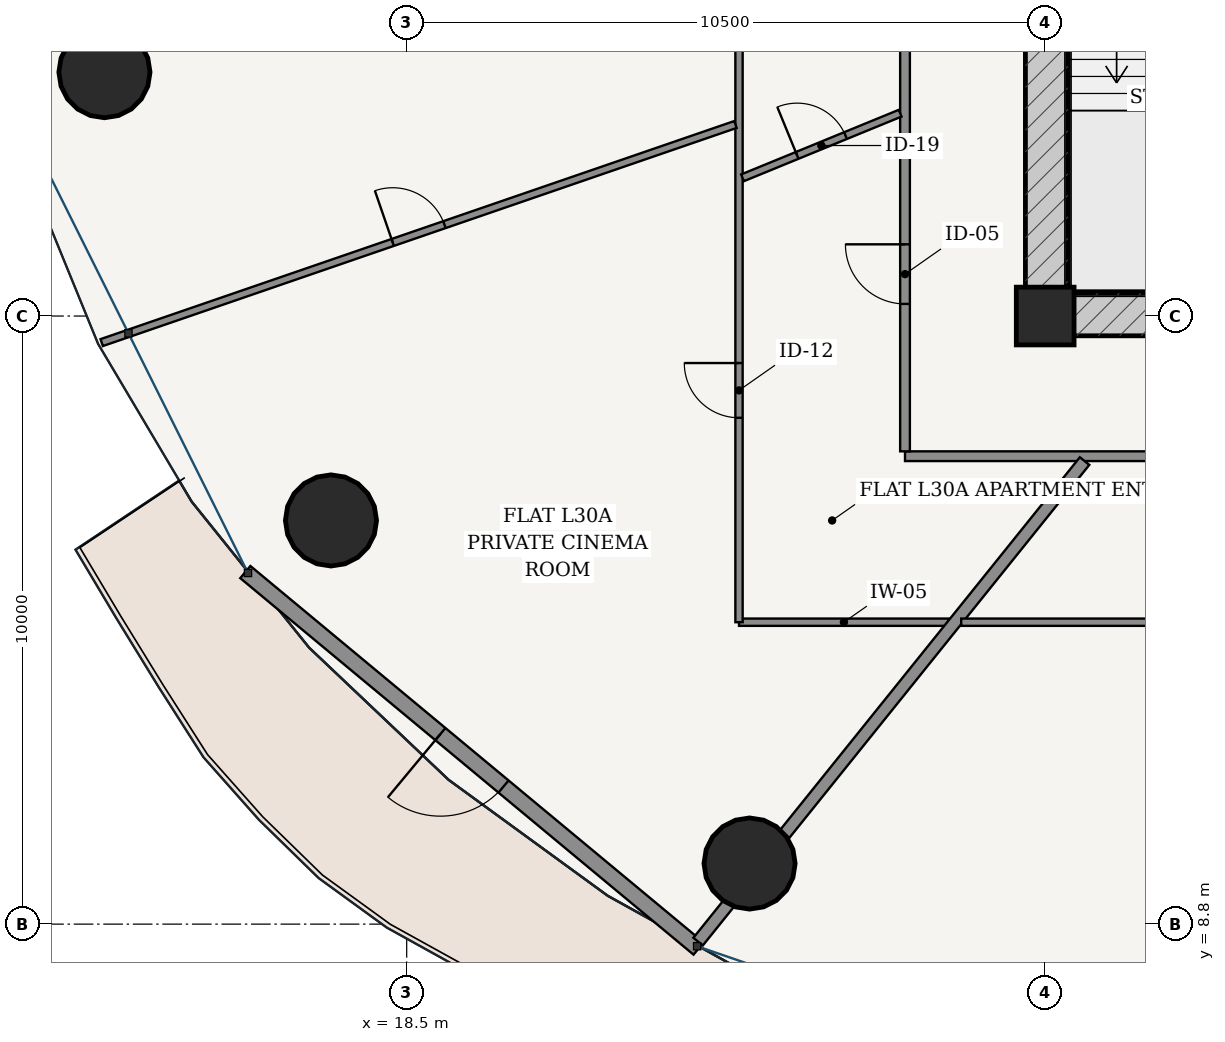
"""IFC4 building model, lengths in metres.
Left out: names, types, materials, properties, quantities, classifications, styles, units other than length and angle.
Written with IfcOpenShell. Run it as: python <this file> out.ifc"""

import sys

from ifc_helpers import new_model, si_unit, direction, frame, frame_2d, origin, origin_2d, place, context, subcontext, project, spatial, rectangle, hollow_circle, extrude, source, transform, mapped, element, fill, save


model = new_model("IFC4")
c1 = context("Model", 3, precision=1e-05, world=origin(), true_north=direction((-0.2419218956, 0.970295726276)))
c2 = subcontext(c1, "Body", "Model", "MODEL_VIEW")
j1 = project(units=[si_unit("LENGTHUNIT", "METRE"), si_unit("PLANEANGLEUNIT", "RADIAN")], contexts=[c1])
p1 = place(None, origin())
s1 = spatial("IfcSite", under=j1, at=p1, CompositionType="ELEMENT")
p2 = place(p1, origin())
s2 = spatial("IfcBuilding", under=s1, at=p2, CompositionType="ELEMENT")
p3 = place(p2, frame((0.0, 0.0, 115.8)))
s3 = spatial("IfcBuildingStorey", under=s2, at=p3, CompositionType="ELEMENT", Elevation=115.8)
p4 = place(p3, frame((29.0, 18.8, 0.0), z_axis=(0.0, 0.0, 1.0), x_axis=(1.0, 0.0, 0.0)))
e1 = element("IfcColumn", 1, at=p4, inside=s3, PredefinedType="COLUMN", context=c2, shape_type="SweptSolid", body=[
    extrude(rectangle(XDim=0.95, YDim=0.95, at=origin_2d()), origin(), (0.0, 0.0, 1.0), 3.6),
])
p5 = place(p3, frame((28.675, 18.825, 0.0), z_axis=(0.0, 0.0, 1.0), x_axis=(1.0, 0.0, 0.0)))
e2 = element("IfcWall", 2, at=p5, inside=s3, PredefinedType="SHEAR", context=c2, shape_type="SweptSolid", body=[
    extrude(rectangle(XDim=18.65, YDim=0.7, at=frame_2d((9.325, 0.0))), origin(), (0.0, 0.0, 1.0), 3.325),
])
p6 = place(p5, frame((7.577, 0.0, 0.0)))
e3 = element("IfcOpeningElement", 3, at=p6, cuts=e2, PredefinedType="OPENING", context=c2, shape_type="SweptSolid", body=[
    extrude(rectangle(XDim=0.85, YDim=2.1, at=frame_2d((0.425, 1.05))), frame((0.0, 0.36, 0.0), z_axis=(0.0, -1.0, 0.0), x_axis=(1.0, 0.0, 0.0)), (0.0, 0.0, 1.0), 0.72),
])
p7 = place(p5, frame((10.623, 0.0, 0.0)))
e4 = element("IfcOpeningElement", 4, at=p7, cuts=e2, PredefinedType="OPENING", context=c2, shape_type="SweptSolid", body=[
    extrude(rectangle(XDim=0.85, YDim=2.1, at=frame_2d((0.425, 1.05))), frame((0.0, 0.36, 0.0), z_axis=(0.0, -1.0, 0.0), x_axis=(1.0, 0.0, 0.0)), (0.0, 0.0, 1.0), 0.72),
])
p8 = place(p3, frame((29.025, 19.175, 0.0), z_axis=(0.0, 0.0, 1.0), x_axis=(0.0, 1.0, 0.0)))
e5 = element("IfcWall", 5, at=p8, inside=s3, PredefinedType="SHEAR", context=c2, shape_type="SweptSolid", body=[
    extrude(rectangle(XDim=15.25, YDim=0.7, at=frame_2d((7.625, 0.0))), origin(), (0.0, 0.0, 1.0), 3.325),
])
p9 = place(p8, frame((9.875, 0.0, 0.0)))
e6 = element("IfcOpeningElement", 6, at=p9, cuts=e5, PredefinedType="OPENING", context=c2, shape_type="SweptSolid", body=[
    extrude(rectangle(XDim=1.5, YDim=2.2, at=frame_2d((0.75, 1.1))), frame((0.0, 0.36, 0.0), z_axis=(0.0, -1.0, 0.0), x_axis=(1.0, 0.0, 0.0)), (0.0, 0.0, 1.0), 0.72),
])
for number, where, z_axis, x_axis in (
    (7, (13.529, 22.81, 0.0), (0.0, 0.0, 1.0), (1.0, 0.0, 0.0)),
    (8, (17.255, 15.438, 0.0), (0.0, 0.0, 1.0), (1.0, 0.0, 0.0)),
    (9, (24.138, 9.796, 0.0), (0.0, 0.0, 1.0), (1.0, 0.0, 0.0)),
):
    element("IfcColumn", number, at=place(p3, frame(where, z_axis=z_axis, x_axis=x_axis)), inside=s3, PredefinedType="COLUMN", context=c2, shape_type="SweptSolid", body=[
        extrude(hollow_circle(Radius=0.75, WallThickness=0.045, at=origin_2d()), origin(), (0.0, 0.0, 1.0), 3.6),
    ])
p10 = place(p3, frame((15.846, 14.59, 0.0), z_axis=(0.0, 0.0, 1.0), x_axis=(0.769254958887, -0.638941944333, 0.0)))
e10 = element("IfcWall", 10, at=p10, inside=s3, PredefinedType="SOLIDWALL", context=c2, shape_type="SweptSolid", body=[
    extrude(rectangle(XDim=9.69, YDim=0.26, at=frame_2d((4.845, 0.0))), origin(), (0.0, 0.0, 1.0), 3.325),
])
p11 = place(p10, frame((4.17, 0.0, 0.0)))
e11 = element("IfcOpeningElement", 11, at=p11, cuts=e10, PredefinedType="OPENING", context=c2, shape_type="SweptSolid", body=[
    extrude(rectangle(XDim=1.35, YDim=2.2, at=frame_2d((0.675, 1.1))), frame((0.0, 0.14, 0.0), z_axis=(0.0, -1.0, 0.0), x_axis=(1.0, 0.0, 0.0)), (0.0, 0.0, 1.0), 0.28),
])
p12 = place(p3, frame((26.695, 16.495, 0.0), z_axis=(0.0, 0.0, 1.0), x_axis=(1.0, 0.0, 0.0)))
e12 = element("IfcWall", 12, at=p12, inside=s3, PredefinedType="PARTITIONING", context=c2, shape_type="SweptSolid", body=[
    extrude(rectangle(XDim=22.61, YDim=0.16, at=frame_2d((11.305, 0.0))), origin(), (0.0, 0.0, 1.0), 2.767),
])
p13 = place(p3, frame((26.695, 16.575, 0.0), z_axis=(0.0, 0.0, 1.0), x_axis=(0.0, 1.0, 0.0)))
e13 = element("IfcWall", 13, at=p13, inside=s3, PredefinedType="PARTITIONING", context=c2, shape_type="SweptSolid", body=[
    extrude(rectangle(XDim=20.45, YDim=0.16, at=frame_2d((10.225, 0.0))), origin(), (0.0, 0.0, 1.0), 2.767),
])
p14 = place(p13, frame((2.424, 0.0, 0.0)))
e14 = element("IfcOpeningElement", 14, at=p14, cuts=e13, PredefinedType="OPENING", context=c2, shape_type="SweptSolid", body=[
    extrude(rectangle(XDim=0.98, YDim=2.2, at=frame_2d((0.49, 1.1))), frame((0.0, 0.09, 0.0), z_axis=(0.0, -1.0, 0.0), x_axis=(1.0, 0.0, 0.0)), (0.0, 0.0, 1.0), 0.18),
])
p15 = place(p3, frame((27.415, 13.765, 0.0), z_axis=(0.0, 0.0, 1.0), x_axis=(-1.0, 0.0, 0.0)))
e15 = element("IfcWall", 15, at=p15, inside=s3, PredefinedType="PARTITIONING", context=c2, shape_type="SweptSolid", body=[
    extrude(rectangle(XDim=3.45, YDim=0.12, at=frame_2d((1.725, 0.0))), origin(), (0.0, 0.0, 1.0), 2.767),
])
p16 = place(p3, frame((23.965, 13.765, 0.0), z_axis=(0.0, 0.0, 1.0), x_axis=(0.0, 1.0, 0.0)))
e16 = element("IfcWall", 16, at=p16, inside=s3, PredefinedType="PARTITIONING", context=c2, shape_type="SweptSolid", body=[
    extrude(rectangle(XDim=26.07, YDim=0.12, at=frame_2d((13.035, 0.0))), origin(), (0.0, 0.0, 1.0), 2.767),
])
p17 = place(p16, frame((3.362, 0.0, 0.0)))
e17 = element("IfcOpeningElement", 17, at=p17, cuts=e16, PredefinedType="OPENING", context=c2, shape_type="SweptSolid", body=[
    extrude(rectangle(XDim=0.9, YDim=2.15, at=frame_2d((0.45, 1.075))), frame((0.0, 0.07, 0.0), z_axis=(0.0, -1.0, 0.0), x_axis=(1.0, 0.0, 0.0)), (0.0, 0.0, 1.0), 0.14),
])
p18 = place(p16, frame((13.924, 0.0, 0.0)))
e18 = element("IfcOpeningElement", 18, at=p18, cuts=e16, PredefinedType="OPENING", context=c2, shape_type="SweptSolid", body=[
    extrude(rectangle(XDim=0.9, YDim=2.15, at=frame_2d((0.45, 1.075))), frame((0.0, 0.07, 0.0), z_axis=(0.0, -1.0, 0.0), x_axis=(1.0, 0.0, 0.0)), (0.0, 0.0, 1.0), 0.14),
])
p19 = place(p3, frame((23.906, 21.95, 0.0), z_axis=(0.0, 0.0, 1.0), x_axis=(-0.945573120726, -0.32540970078, 0.0)))
e19 = element("IfcWall", 19, at=p19, inside=s3, PredefinedType="PARTITIONING", context=c2, shape_type="SweptSolid", body=[
    extrude(rectangle(XDim=11.022, YDim=0.12, at=frame_2d((5.511, 0.0))), origin(), (0.0, 0.0, 1.0), 2.767),
])
p20 = place(p19, frame((5.061, 0.0, 0.0)))
e20 = element("IfcOpeningElement", 20, at=p20, cuts=e19, PredefinedType="OPENING", context=c2, shape_type="SweptSolid", body=[
    extrude(rectangle(XDim=0.9, YDim=2.15, at=frame_2d((0.45, 1.075))), frame((0.0, 0.07, 0.0), z_axis=(0.0, -1.0, 0.0), x_axis=(1.0, 0.0, 0.0)), (0.0, 0.0, 1.0), 0.14),
])
p21 = place(p3, frame((26.615, 22.135, 0.0), z_axis=(0.0, 0.0, 1.0), x_axis=(-0.925337216259, -0.379145138708, 0.0)))
e21 = element("IfcWall", 21, at=p21, inside=s3, PredefinedType="PARTITIONING", context=c2, shape_type="SweptSolid", body=[
    extrude(rectangle(XDim=2.802, YDim=0.12, at=frame_2d((1.401, 0.0))), origin(), (0.0, 0.0, 1.0), 3.325),
])
p22 = place(p21, frame((0.971, 0.0, 0.0)))
e22 = element("IfcOpeningElement", 22, at=p22, cuts=e21, PredefinedType="OPENING", context=c2, shape_type="SweptSolid", body=[
    extrude(rectangle(XDim=0.86, YDim=2.15, at=frame_2d((0.43, 1.075))), frame((0.0, 0.07, 0.0), z_axis=(0.0, -1.0, 0.0), x_axis=(1.0, 0.0, 0.0)), (0.0, 0.0, 1.0), 0.14),
])
p23 = place(p3, frame((29.648, 16.415, 0.0), z_axis=(0.0, 0.0, 1.0), x_axis=(-0.626701127389, -0.779259710834, 0.0)))
e23 = element("IfcWall", 23, at=p23, inside=s3, PredefinedType="PARTITIONING", context=c2, shape_type="SweptSolid", body=[
    extrude(rectangle(XDim=10.141, YDim=0.2, at=frame_2d((5.071, 0.0))), origin(), (0.0, 0.0, 1.0), 2.767),
])
p24 = place(p3, frame((52.035, 13.765, 0.0), z_axis=(0.0, 0.0, 1.0), x_axis=(-1.0, 0.0, 0.0)))
e24 = element("IfcWall", 24, at=p24, inside=s3, PredefinedType="PARTITIONING", context=c2, shape_type="SweptSolid", body=[
    extrude(rectangle(XDim=24.416, YDim=0.12, at=frame_2d((12.208, 0.0))), origin(), (0.0, 0.0, 1.0), 2.767),
])
p25 = place(p24, frame((4.192, 0.0, 0.0)))
e25 = element("IfcOpeningElement", 25, at=p25, cuts=e24, PredefinedType="OPENING", context=c2, shape_type="SweptSolid", body=[
    extrude(rectangle(XDim=0.9, YDim=2.15, at=frame_2d((0.45, 1.075))), frame((0.0, 0.07, 0.0), z_axis=(0.0, -1.0, 0.0), x_axis=(1.0, 0.0, 0.0)), (0.0, 0.0, 1.0), 0.14),
])
p26 = place(p24, frame((19.728, 0.0, 0.0)))
e26 = element("IfcOpeningElement", 26, at=p26, cuts=e24, PredefinedType="OPENING", context=c2, shape_type="SweptSolid", body=[
    extrude(rectangle(XDim=0.86, YDim=2.15, at=frame_2d((0.43, 1.075))), frame((0.0, 0.07, 0.0), z_axis=(0.0, -1.0, 0.0), x_axis=(1.0, 0.0, 0.0)), (0.0, 0.0, 1.0), 0.14),
])
m1 = source(origin(), c2, "Body", "SweptSolid", [
    extrude(rectangle(XDim=1.35, YDim=2.2, at=frame_2d((0.675, 1.1))), frame((0.0, 0.025, 0.0), z_axis=(0.0, -1.0, 0.0), x_axis=(1.0, 0.0, 0.0)), (0.0, 0.0, 1.0), 0.05),
])
p27 = place(p11, frame((1.35, 0.0, 0.0), z_axis=(0.0, 0.0, 1.0), x_axis=(-1.0, 0.0, 0.0)))
e27 = element("IfcDoor", 27, at=p27, inside=s3, OperationType="SINGLE_SWING_RIGHT", PredefinedType="DOOR", context=c2, shape_type="MappedRepresentation", body=[
    mapped(m1, transform((0.0, 0.0, 0.0), scale=1.0)),
])
fill(e11, e27)
m2 = source(origin(), c2, "Body", "SweptSolid", [
    extrude(rectangle(XDim=0.98, YDim=2.2, at=frame_2d((0.49, 1.1))), frame((0.0, 0.025, 0.0), z_axis=(0.0, -1.0, 0.0), x_axis=(1.0, 0.0, 0.0)), (0.0, 0.0, 1.0), 0.05),
])
p28 = place(p14, origin())
e28 = element("IfcDoor", 28, at=p28, inside=s3, OperationType="SINGLE_SWING_RIGHT", PredefinedType="DOOR", context=c2, shape_type="MappedRepresentation", body=[
    mapped(m2, transform((0.0, 0.0, 0.0), scale=1.0)),
])
fill(e14, e28)
m3 = source(origin(), c2, "Body", "SweptSolid", [
    extrude(rectangle(XDim=0.86, YDim=2.15, at=frame_2d((0.43, 1.075))), frame((0.0, 0.025, 0.0), z_axis=(0.0, -1.0, 0.0), x_axis=(1.0, 0.0, 0.0)), (0.0, 0.0, 1.0), 0.05),
])
p29 = place(p22, frame((0.86, 0.0, 0.0), z_axis=(0.0, 0.0, 1.0), x_axis=(-1.0, 0.0, 0.0)))
e29 = element("IfcDoor", 29, at=p29, inside=s3, OperationType="SINGLE_SWING_LEFT", PredefinedType="DOOR", context=c2, shape_type="MappedRepresentation", body=[
    mapped(m3, transform((0.0, 0.0, 0.0), scale=1.0)),
])
fill(e22, e29)
m4 = source(origin(), c2, "Body", "SweptSolid", [
    extrude(rectangle(XDim=0.9, YDim=2.15, at=frame_2d((0.45, 1.075))), frame((0.0, 0.025, 0.0), z_axis=(0.0, -1.0, 0.0), x_axis=(1.0, 0.0, 0.0)), (0.0, 0.0, 1.0), 0.05),
])
p30 = place(p17, origin())
e30 = element("IfcDoor", 30, at=p30, inside=s3, OperationType="SINGLE_SWING_RIGHT", PredefinedType="DOOR", context=c2, shape_type="MappedRepresentation", body=[
    mapped(m4, transform((0.0, 0.0, 0.0), scale=1.0)),
])
fill(e17, e30)
p31 = place(p20, frame((0.9, 0.0, 0.0), z_axis=(0.0, 0.0, 1.0), x_axis=(-1.0, 0.0, 0.0)))
e31 = element("IfcDoor", 31, at=p31, inside=s3, OperationType="SINGLE_SWING_LEFT", PredefinedType="DOOR", context=c2, shape_type="MappedRepresentation", body=[
    mapped(m4, transform((0.0, 0.0, 0.0), scale=1.0)),
])
fill(e20, e31)
save(model, sys.argv[1])
